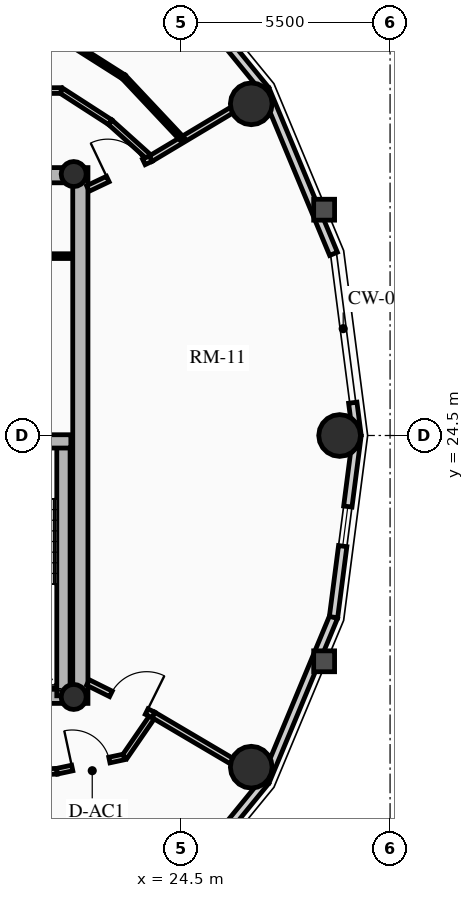
"""IFC4 building model, lengths in metres.
Left out: names, types, materials, properties, quantities, classifications, styles, units other than length and angle.
Written with IfcOpenShell. Run it as: python <this file> out.ifc"""

import sys

from ifc_helpers import new_model, si_unit, direction, frame, frame_2d, origin, origin_2d, place, context, subcontext, project, spatial, rectangle, circle, hollow_circle, extrude, source, transform, mapped, element, fill, save


model = new_model("IFC4")
c1 = context("Model", 3, precision=1e-05, world=origin(), true_north=direction((0.0, 1.0)))
c2 = subcontext(c1, "Body", "Model", "MODEL_VIEW")
j1 = project(units=[si_unit("LENGTHUNIT", "METRE"), si_unit("PLANEANGLEUNIT", "RADIAN")], contexts=[c1])
p1 = place(None, origin())
s1 = spatial("IfcSite", under=j1, at=p1, CompositionType="ELEMENT")
p2 = place(p1, origin())
s2 = spatial("IfcBuilding", under=s1, at=p2, CompositionType="ELEMENT")
p3 = place(p2, frame((0.0, 0.0, 222.85)))
s3 = spatial("IfcBuildingStorey", under=s2, at=p3, CompositionType="ELEMENT", Elevation=222.85)
p4 = place(p3, frame((21.85, 17.45, 0.0), z_axis=(0.0, 0.0, 1.0), x_axis=(0.0, 1.0, 0.0)))
e1 = element("IfcWall", 1, at=p4, inside=s3, PredefinedType="SHEAR", context=c2, shape_type="SweptSolid", body=[
    extrude(rectangle(XDim=14.1, YDim=0.4, at=frame_2d((7.05, 0.0))), origin(), (0.0, 0.0, 1.0), 3.2),
])
p5 = place(p3, frame((11.15, 17.65, 0.0), z_axis=(0.0, 0.0, 1.0), x_axis=(1.0, 0.0, 0.0)))
e2 = element("IfcWall", 2, at=p5, inside=s3, PredefinedType="SHEAR", context=c2, shape_type="SweptSolid", body=[
    extrude(rectangle(XDim=10.7, YDim=0.4, at=frame_2d((5.35, 0.0))), origin(), (0.0, 0.0, 1.0), 3.2),
])
m1 = source(origin(), c2, "Body", "SweptSolid", [
    extrude(rectangle(XDim=1.5, YDim=2.02, at=frame_2d((0.75, 1.01))), frame((0.0, 0.21, 0.0), z_axis=(0.0, -1.0, 0.0), x_axis=(1.0, 0.0, 0.0)), (0.0, 0.0, 1.0), 0.42),
])
p6 = place(p5, frame((5.45, 0.0, 0.0)))
e3 = element("IfcOpeningElement", 3, at=p6, cuts=e2, PredefinedType="OPENING", context=c2, shape_type="MappedRepresentation", body=[
    mapped(m1, transform((0.0, 0.0, 0.0), x_axis=(1.0, 0.0, 0.0), y_axis=(0.0, 1.0, 0.0), z_axis=(0.0, 0.0, 1.0), scale=1.0)),
])
p7 = place(p3, frame((11.15, 31.35, 0.0), z_axis=(0.0, 0.0, 1.0), x_axis=(1.0, 0.0, 0.0)))
e4 = element("IfcWall", 4, at=p7, inside=s3, PredefinedType="SHEAR", context=c2, shape_type="SweptSolid", body=[
    extrude(rectangle(XDim=10.7, YDim=0.4, at=frame_2d((5.35, 0.0))), origin(), (0.0, 0.0, 1.0), 3.2),
])
p8 = place(p7, frame((4.6, 0.0, 0.0)))
e5 = element("IfcOpeningElement", 5, at=p8, cuts=e4, PredefinedType="OPENING", context=c2, shape_type="MappedRepresentation", body=[
    mapped(m1, transform((0.0, 0.0, 0.0), x_axis=(1.0, 0.0, 0.0), y_axis=(0.0, 1.0, 0.0), z_axis=(0.0, 0.0, 1.0), scale=1.0)),
])
p9 = place(p3, frame((21.405, 17.65, 0.0), z_axis=(0.0, 0.0, 1.0), x_axis=(0.0, 1.0, 0.0)))
e6 = element("IfcWall", 6, at=p9, inside=s3, PredefinedType="SHEAR", context=c2, shape_type="SweptSolid", body=[
    extrude(rectangle(XDim=6.695, YDim=0.35, at=frame_2d((3.348, 0.0))), origin(), (0.0, 0.0, 1.0), 3.2),
])
p10 = place(p3, frame((18.315, 24.345, 0.0), z_axis=(0.0, 0.0, 1.0), x_axis=(1.0, 0.0, 0.0)))
e7 = element("IfcWall", 7, at=p10, inside=s3, PredefinedType="SHEAR", context=c2, shape_type="SweptSolid", body=[
    extrude(rectangle(XDim=3.285, YDim=0.35, at=frame_2d((1.643, 0.0))), origin(), (0.0, 0.0, 1.0), 3.2),
])
for number, where, z_axis, x_axis in (
    (8, (21.675, 17.62, 0.0), (0.0, 0.0, 1.0), (1.0, 0.0, 0.0)),
    (9, (21.675, 31.38, 0.0), (0.0, 0.0, 1.0), (1.0, 0.0, 0.0)),
):
    element("IfcColumn", number, at=place(p3, frame(where, z_axis=z_axis, x_axis=x_axis)), inside=s3, PredefinedType="COLUMN", context=c2, shape_type="SweptSolid", body=[
        extrude(hollow_circle(Radius=0.33, WallThickness=0.025, at=origin_2d()), origin(), (0.0, 0.0, 1.0), 3.2),
    ])
for number, where, z_axis, x_axis in (
    (10, (28.672, 24.5, 0.0), (0.0, 0.0, 1.0), (1.0, 0.0, 0.0)),
    (11, (26.347, 33.229, 0.0), (0.0, 0.0, 1.0), (1.0, 0.0, 0.0)),
    (12, (26.347, 15.771, 0.0), (0.0, 0.0, 1.0), (1.0, 0.0, 0.0)),
):
    element("IfcColumn", number, at=place(p3, frame(where, z_axis=z_axis, x_axis=x_axis)), inside=s3, PredefinedType="USERDEFINED", context=c2, shape_type="SweptSolid", body=[
        extrude(circle(Radius=0.55, at=origin_2d()), origin(), (0.0, 0.0, 1.0), 3.2),
    ])
p11 = place(p3, frame((29.018, 25.363, 0.0), z_axis=(0.0, 0.0, 1.0), x_axis=(0.128247365719, -0.991742211054, 0.0)))
e13 = element("IfcWall", 13, at=p11, inside=s3, PredefinedType="SOLIDWALL", context=c2, shape_type="SweptSolid", body=[
    extrude(rectangle(XDim=0.87, YDim=0.22, at=frame_2d((0.435, 0.0))), origin(), (0.0, 0.0, 1.0), 2.612),
])
p12 = place(p3, frame((26.718, 33.593, 0.0), z_axis=(0.0, 0.0, 1.0), x_axis=(0.384036305194, -0.923317993052, 0.0)))
e14 = element("IfcWall", 14, at=p12, inside=s3, PredefinedType="SOLIDWALL", context=c2, shape_type="SweptSolid", body=[
    extrude(rectangle(XDim=4.671, YDim=0.22, at=frame_2d((2.335, 0.0))), origin(), (0.0, 0.0, 1.0), 2.612),
])
p13 = place(p3, frame((23.924, 37.015, 0.0), z_axis=(0.0, 0.0, 1.0), x_axis=(0.632467166636, -0.774587169483, 0.0)))
e15 = element("IfcWall", 15, at=p13, inside=s3, PredefinedType="SOLIDWALL", context=c2, shape_type="SweptSolid", body=[
    extrude(rectangle(XDim=4.418, YDim=0.22, at=frame_2d((2.209, 0.0))), origin(), (0.0, 0.0, 1.0), 2.612),
])
m2 = source(origin(), c2, "Body", "SweptSolid", [
    extrude(rectangle(XDim=1.05, YDim=1.3, at=frame_2d((0.525, 0.65))), frame((0.0, 0.12, 0.0), z_axis=(0.0, -1.0, 0.0), x_axis=(1.0, 0.0, 0.0)), (0.0, 0.0, 1.0), 0.24),
])
p14 = place(p13, frame((1.684, 0.0, 0.65)))
e16 = element("IfcOpeningElement", 16, at=p14, cuts=e15, PredefinedType="OPENING", context=c2, shape_type="MappedRepresentation", body=[
    mapped(m2, transform((0.0, 0.0, 0.0), x_axis=(1.0, 0.0, 0.0), y_axis=(0.0, 1.0, 0.0), z_axis=(0.0, 0.0, 1.0), scale=1.0)),
])
p15 = place(p3, frame((26.718, 15.407, 0.0), z_axis=(0.0, 0.0, 1.0), x_axis=(-0.632467166636, -0.774587169483, 0.0)))
e17 = element("IfcWall", 17, at=p15, inside=s3, PredefinedType="SOLIDWALL", context=c2, shape_type="SweptSolid", body=[
    extrude(rectangle(XDim=4.418, YDim=0.22, at=frame_2d((2.209, 0.0))), origin(), (0.0, 0.0, 1.0), 2.612),
])
p16 = place(p15, frame((1.684, 0.0, 0.65)))
e18 = element("IfcOpeningElement", 18, at=p16, cuts=e17, PredefinedType="OPENING", context=c2, shape_type="MappedRepresentation", body=[
    mapped(m2, transform((0.0, 0.0, 0.0), x_axis=(1.0, 0.0, 0.0), y_axis=(0.0, 1.0, 0.0), z_axis=(0.0, 0.0, 1.0), scale=1.0)),
])
p17 = place(p3, frame((28.512, 19.719, 0.0), z_axis=(0.0, 0.0, 1.0), x_axis=(-0.384036305194, -0.923317993052, 0.0)))
e19 = element("IfcWall", 19, at=p17, inside=s3, PredefinedType="SOLIDWALL", context=c2, shape_type="SweptSolid", body=[
    extrude(rectangle(XDim=4.671, YDim=0.22, at=frame_2d((2.335, 0.0))), origin(), (0.0, 0.0, 1.0), 2.612),
])
p18 = place(p3, frame((29.13, 24.5, 0.0), z_axis=(0.0, 0.0, 1.0), x_axis=(-0.128241318541, -0.991742993027, 0.0)))
e20 = element("IfcWall", 20, at=p18, inside=s3, PredefinedType="SOLIDWALL", context=c2, shape_type="SweptSolid", body=[
    extrude(rectangle(XDim=4.82, YDim=0.22, at=frame_2d((2.41, 0.0))), origin(), (0.0, 0.0, 1.0), 2.612),
])
p19 = place(p18, frame((1.885, 0.0, 0.65)))
e21 = element("IfcOpeningElement", 21, at=p19, cuts=e20, PredefinedType="OPENING", context=c2, shape_type="MappedRepresentation", body=[
    mapped(m2, transform((0.0, 0.0, 0.0), x_axis=(1.0, 0.0, 0.0), y_axis=(0.0, 1.0, 0.0), z_axis=(0.0, 0.0, 1.0), scale=1.0)),
])
p20 = place(p3, frame((18.38, 29.22, 0.0), z_axis=(0.0, 0.0, 1.0), x_axis=(1.0, 0.0, 0.0)))
e22 = element("IfcWall", 22, at=p20, inside=s3, PredefinedType="PARTITIONING", context=c2, shape_type="SweptSolid", body=[
    extrude(rectangle(XDim=3.22, YDim=0.125, at=frame_2d((1.61, 0.0))), origin(), (0.0, 0.0, 1.0), 2.512),
])
p21 = place(p3, frame((23.701, 31.786, 0.0), z_axis=(0.0, 0.0, 1.0), x_axis=(-0.743742806382, 0.668465883913, 0.0)))
e23 = element("IfcWall", 23, at=p21, inside=s3, PredefinedType="PARTITIONING", context=c2, shape_type="SweptSolid", body=[
    extrude(rectangle(XDim=1.434, YDim=0.15, at=frame_2d((0.717, 0.0))), origin(), (0.0, 0.0, 1.0), 2.612),
])
p22 = place(p3, frame((22.635, 32.744, 0.0), z_axis=(0.0, 0.0, 1.0), x_axis=(-0.840119270642, 0.542401706391, 0.0)))
e24 = element("IfcWall", 24, at=p22, inside=s3, PredefinedType="PARTITIONING", context=c2, shape_type="SweptSolid", body=[
    extrude(rectangle(XDim=1.538, YDim=0.15, at=frame_2d((0.769, 0.0))), origin(), (0.0, 0.0, 1.0), 2.545),
])
p23 = place(p3, frame((21.344, 33.578, 0.0), z_axis=(0.0, 0.0, 1.0), x_axis=(-0.999984243152, -0.005613684, 0.0)))
e25 = element("IfcWall", 25, at=p23, inside=s3, PredefinedType="PARTITIONING", context=c2, shape_type="SweptSolid", body=[
    extrude(rectangle(XDim=3.262, YDim=0.15, at=frame_2d((1.631, 0.0))), origin(), (0.0, 0.0, 1.0), 2.612),
])
m3 = source(origin(), c2, "Body", "SweptSolid", [
    extrude(rectangle(XDim=1.05, YDim=2.015, at=frame_2d((0.525, 1.007))), frame((0.0, 0.085, 0.0), z_axis=(0.0, -1.0, 0.0), x_axis=(1.0, 0.0, 0.0)), (0.0, 0.0, 1.0), 0.17),
])
p24 = place(p23, frame((1.599, 0.0, 0.0)))
e26 = element("IfcOpeningElement", 26, at=p24, cuts=e25, PredefinedType="OPENING", context=c2, shape_type="MappedRepresentation", body=[
    mapped(m3, transform((0.0, 0.0, 0.0), x_axis=(1.0, 0.0, 0.0), y_axis=(0.0, 1.0, 0.0), z_axis=(0.0, 0.0, 1.0), scale=1.0)),
])
p25 = place(p3, frame((14.845, 15.441, 0.0), z_axis=(0.0, 0.0, 1.0), x_axis=(0.99938794868, 0.034981824334, 0.0)))
e27 = element("IfcWall", 27, at=p25, inside=s3, PredefinedType="PARTITIONING", context=c2, shape_type="SweptSolid", body=[
    extrude(rectangle(XDim=6.393, YDim=0.15, at=frame_2d((3.196, 0.0))), origin(), (0.0, 0.0, 1.0), 2.545),
])
p26 = place(p3, frame((21.234, 15.664, 0.0), z_axis=(0.0, 0.0, 1.0), x_axis=(0.977931581182, 0.208925399431, 0.0)))
e28 = element("IfcWall", 28, at=p26, inside=s3, PredefinedType="PARTITIONING", context=c2, shape_type="SweptSolid", body=[
    extrude(rectangle(XDim=1.823, YDim=0.15, at=frame_2d((0.912, 0.0))), origin(), (0.0, 0.0, 1.0), 2.545),
])
m4 = source(origin(), c2, "Body", "SweptSolid", [
    extrude(rectangle(XDim=1.0, YDim=2.015, at=frame_2d((0.5, 1.007))), frame((0.0, 0.085, 0.0), z_axis=(0.0, -1.0, 0.0), x_axis=(1.0, 0.0, 0.0)), (0.0, 0.0, 1.0), 0.17),
])
p27 = place(p26, frame((0.412, 0.0, 0.0)))
e29 = element("IfcOpeningElement", 29, at=p27, cuts=e28, PredefinedType="OPENING", context=c2, shape_type="MappedRepresentation", body=[
    mapped(m4, transform((0.0, 0.0, 0.0), x_axis=(1.0, 0.0, 0.0), y_axis=(0.0, 1.0, 0.0), z_axis=(0.0, 0.0, 1.0), scale=1.0)),
])
p28 = place(p3, frame((23.017, 16.045, 0.0), z_axis=(0.0, 0.0, 1.0), x_axis=(0.566660656138, 0.823951273308, 0.0)))
e30 = element("IfcWall", 30, at=p28, inside=s3, PredefinedType="PARTITIONING", context=c2, shape_type="SweptSolid", body=[
    extrude(rectangle(XDim=1.336, YDim=0.15, at=frame_2d((0.668, 0.0))), origin(), (0.0, 0.0, 1.0), 2.612),
])
p29 = place(p3, frame((23.701, 31.786, 0.0), z_axis=(0.0, 0.0, 1.0), x_axis=(0.858059206709, 0.513550774298, 0.0)))
e31 = element("IfcWall", 31, at=p29, inside=s3, PredefinedType="PARTITIONING", context=c2, shape_type="SweptSolid", body=[
    extrude(rectangle(XDim=3.497, YDim=0.16, at=frame_2d((1.748, 0.0))), origin(), (0.0, 0.0, 1.0), 2.612),
])
p30 = place(p3, frame((23.774, 17.146, 0.0), z_axis=(0.0, 0.0, 1.0), x_axis=(0.861296601099, -0.508102514198, 0.0)))
e32 = element("IfcWall", 32, at=p30, inside=s3, PredefinedType="PARTITIONING", context=c2, shape_type="SweptSolid", body=[
    extrude(rectangle(XDim=3.399, YDim=0.16, at=frame_2d((1.7, 0.0))), origin(), (0.0, 0.0, 1.0), 2.612),
])
p31 = place(p3, frame((22.05, 31.0, 0.0), z_axis=(0.0, 0.0, 1.0), x_axis=(0.903013459407, 0.429612257891, 0.0)))
e33 = element("IfcWall", 33, at=p31, inside=s3, PredefinedType="PARTITIONING", context=c2, shape_type="SweptSolid", body=[
    extrude(rectangle(XDim=1.829, YDim=0.16, at=frame_2d((0.914, 0.0))), origin(), (0.0, 0.0, 1.0), 2.545),
])
m5 = source(origin(), c2, "Body", "SweptSolid", [
    extrude(rectangle(XDim=1.05, YDim=2.015, at=frame_2d((0.525, 1.007))), frame((0.0, 0.09, 0.0), z_axis=(0.0, -1.0, 0.0), x_axis=(1.0, 0.0, 0.0)), (0.0, 0.0, 1.0), 0.18),
])
p32 = place(p31, frame((0.579, 0.0, 0.0)))
e34 = element("IfcOpeningElement", 34, at=p32, cuts=e33, PredefinedType="OPENING", context=c2, shape_type="MappedRepresentation", body=[
    mapped(m5, transform((0.0, 0.0, 0.0), x_axis=(1.0, 0.0, 0.0), y_axis=(0.0, 1.0, 0.0), z_axis=(0.0, 0.0, 1.0), scale=1.0)),
])
p33 = place(p3, frame((22.05, 18.0, 0.0), z_axis=(0.0, 0.0, 1.0), x_axis=(0.896045848613, -0.443961526692, 0.0)))
e35 = element("IfcWall", 35, at=p33, inside=s3, PredefinedType="PARTITIONING", context=c2, shape_type="SweptSolid", body=[
    extrude(rectangle(XDim=1.924, YDim=0.16, at=frame_2d((0.962, 0.0))), origin(), (0.0, 0.0, 1.0), 2.545),
])
p34 = place(p33, frame((0.674, 0.0, 0.0)))
e36 = element("IfcOpeningElement", 36, at=p34, cuts=e35, PredefinedType="OPENING", context=c2, shape_type="MappedRepresentation", body=[
    mapped(m5, transform((0.0, 0.0, 0.0), x_axis=(1.0, 0.0, 0.0), y_axis=(0.0, 1.0, 0.0), z_axis=(0.0, 0.0, 1.0), scale=1.0)),
])
p35 = place(p3, frame((24.542, 32.288, 0.0), z_axis=(0.0, 0.0, 1.0), x_axis=(-0.68501091047, 0.72853280814, 0.0)))
e37 = element("IfcWall", 37, at=p35, inside=s3, PredefinedType="PARTITIONING", context=c2, shape_type="SweptSolid", body=[
    extrude(rectangle(XDim=2.261, YDim=0.125, at=frame_2d((1.13, 0.0))), origin(), (0.0, 0.0, 1.0), 2.612),
])
p36 = place(p3, frame((22.993, 33.935, 0.0), z_axis=(0.0, 0.0, 1.0), x_axis=(-0.844312558894, 0.535851008112, 0.0)))
e38 = element("IfcWall", 38, at=p36, inside=s3, PredefinedType="PARTITIONING", context=c2, shape_type="SweptSolid", body=[
    extrude(rectangle(XDim=2.268, YDim=0.125, at=frame_2d((1.134, 0.0))), origin(), (0.0, 0.0, 1.0), 2.545),
])
m6 = source(origin(), c2, "Body", "SweptSolid", [
    extrude(rectangle(XDim=1.05, YDim=1.3, at=frame_2d((0.525, 0.65))), frame((0.0, 0.03, 0.0), z_axis=(0.0, -1.0, 0.0), x_axis=(1.0, 0.0, 0.0)), (0.0, 0.0, 1.0), 0.06),
])
p37 = place(p19, origin())
e39 = element("IfcWindow", 39, at=p37, inside=s3, PartitioningType="SINGLE_PANEL", PredefinedType="WINDOW", context=c2, shape_type="MappedRepresentation", body=[
    mapped(m6, transform((0.0, 0.0, 0.0), x_axis=(1.0, 0.0, 0.0), y_axis=(0.0, 1.0, 0.0), z_axis=(0.0, 0.0, 1.0), scale=1.0)),
])
fill(e21, e39)
m7 = source(origin(), c2, "Body", "SweptSolid", [
    extrude(rectangle(XDim=1.05, YDim=2.015, at=frame_2d((0.525, 1.007))), frame((0.0, 0.025, 0.0), z_axis=(0.0, -1.0, 0.0), x_axis=(1.0, 0.0, 0.0)), (0.0, 0.0, 1.0), 0.05),
])
p38 = place(p32, origin())
e40 = element("IfcDoor", 40, at=p38, inside=s3, OperationType="SINGLE_SWING_LEFT", PredefinedType="DOOR", context=c2, shape_type="MappedRepresentation", body=[
    mapped(m7, transform((0.0, 0.0, 0.0), x_axis=(1.0, 0.0, 0.0), y_axis=(0.0, 1.0, 0.0), z_axis=(0.0, 0.0, 1.0), scale=1.0)),
])
fill(e34, e40)
p39 = place(p34, origin())
e41 = element("IfcDoor", 41, at=p39, inside=s3, OperationType="SINGLE_SWING_RIGHT", PredefinedType="DOOR", context=c2, shape_type="MappedRepresentation", body=[
    mapped(m7, transform((0.0, 0.0, 0.0), x_axis=(1.0, 0.0, 0.0), y_axis=(0.0, 1.0, 0.0), z_axis=(0.0, 0.0, 1.0), scale=1.0)),
])
fill(e36, e41)
m8 = source(origin(), c2, "Body", "SweptSolid", [
    extrude(rectangle(XDim=1.0, YDim=2.015, at=frame_2d((0.5, 1.007))), frame((0.0, 0.025, 0.0), z_axis=(0.0, -1.0, 0.0), x_axis=(1.0, 0.0, 0.0)), (0.0, 0.0, 1.0), 0.05),
])
p40 = place(p27, origin())
e42 = element("IfcDoor", 42, at=p40, inside=s3, OperationType="SINGLE_SWING_LEFT", PredefinedType="DOOR", context=c2, shape_type="MappedRepresentation", body=[
    mapped(m8, transform((0.0, 0.0, 0.0), x_axis=(1.0, 0.0, 0.0), y_axis=(0.0, 1.0, 0.0), z_axis=(0.0, 0.0, 1.0), scale=1.0)),
])
fill(e29, e42)
save(model, sys.argv[1])
